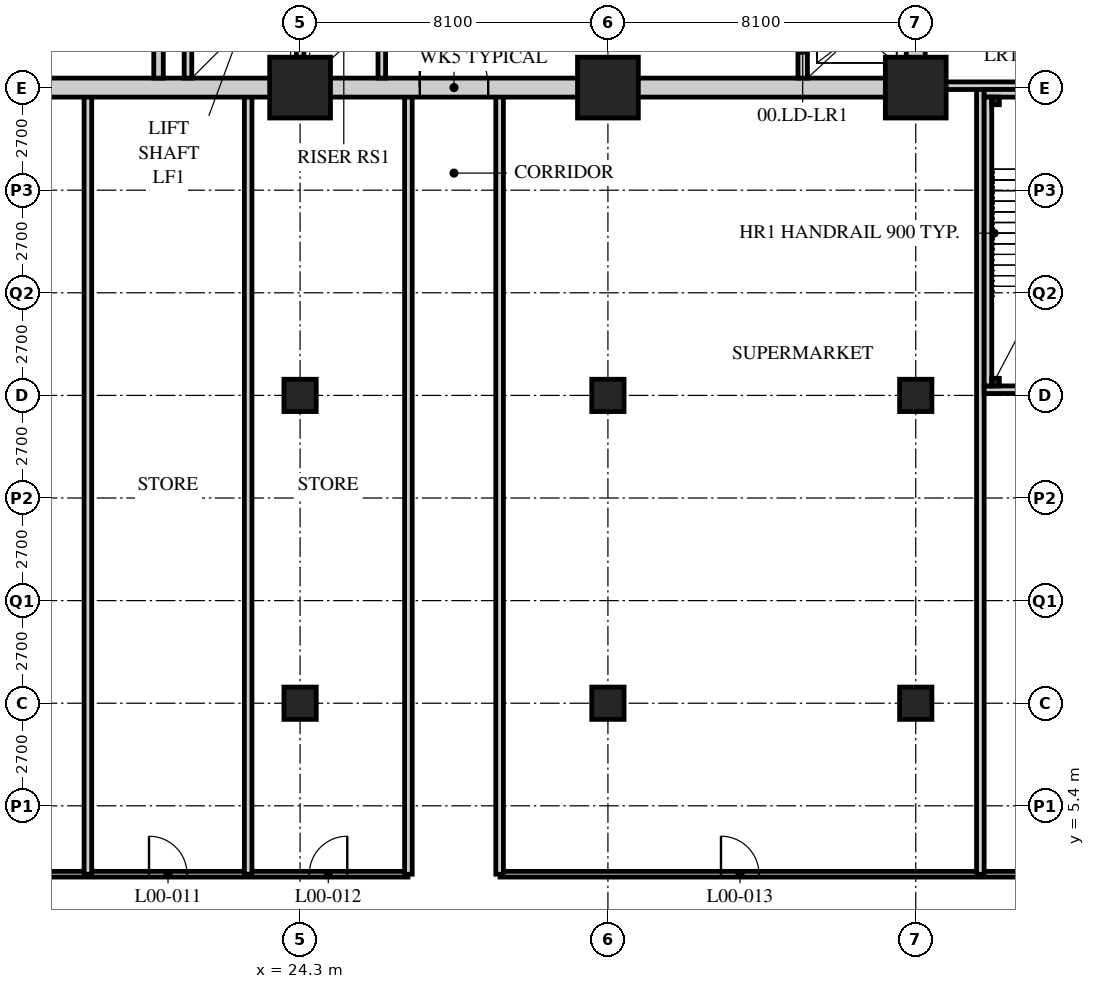
"""IFC4 building model, lengths in metres.
Left out: names, types, materials, properties, quantities, classifications, styles, units other than length and angle.
Written with IfcOpenShell. Run it as: python <this file> out.ifc"""

import sys

from ifc_helpers import new_model, si_unit, direction, frame, frame_2d, origin, origin_2d, place, context, subcontext, project, spatial, rectangle, hollow_rectangle, extrude, element, fill, save


model = new_model("IFC4")
c1 = context("Model", 3, precision=1e-05, world=origin(), true_north=direction((0.0, 1.0)))
c2 = subcontext(c1, "Body", "Model", "MODEL_VIEW")
j1 = project(units=[si_unit("LENGTHUNIT", "METRE"), si_unit("PLANEANGLEUNIT", "RADIAN")], contexts=[c1])
p1 = place(None, origin())
s1 = spatial("IfcSite", under=j1, at=p1, CompositionType="ELEMENT")
p2 = place(p1, origin())
s2 = spatial("IfcBuilding", under=s1, at=p2, CompositionType="ELEMENT")
p3 = place(p2, origin())
s3 = spatial("IfcBuildingStorey", under=s2, at=p3, CompositionType="ELEMENT", Elevation=0.0)
for number, where, z_axis, x_axis in (
    (1, (24.3, 8.1, 0.0), (0.0, 0.0, 1.0), (1.0, 0.0, 0.0)),
    (2, (24.3, 16.2, 0.0), (0.0, 0.0, 1.0), (1.0, 0.0, 0.0)),
):
    element("IfcColumn", number, at=place(p3, frame(where, z_axis=z_axis, x_axis=x_axis)), inside=s3, PredefinedType="COLUMN", context=c2, shape_type="SweptSolid", body=[
        extrude(hollow_rectangle(XDim=0.85, YDim=0.85, WallThickness=0.085, at=origin_2d()), origin(), (0.0, 0.0, 1.0), 6.0),
    ])
p4 = place(p3, frame((24.3, 24.3, 0.0), z_axis=(0.0, 0.0, 1.0), x_axis=(1.0, 0.0, 0.0)))
e3 = element("IfcColumn", 3, at=p4, inside=s3, PredefinedType="COLUMN", context=c2, shape_type="SweptSolid", body=[
    extrude(hollow_rectangle(XDim=1.6, YDim=1.6, WallThickness=0.15, at=origin_2d()), origin(), (0.0, 0.0, 1.0), 6.0),
])
for number, where, z_axis, x_axis in (
    (4, (32.4, 8.1, 0.0), (0.0, 0.0, 1.0), (1.0, 0.0, 0.0)),
    (5, (32.4, 16.2, 0.0), (0.0, 0.0, 1.0), (1.0, 0.0, 0.0)),
):
    element("IfcColumn", number, at=place(p3, frame(where, z_axis=z_axis, x_axis=x_axis)), inside=s3, PredefinedType="COLUMN", context=c2, shape_type="SweptSolid", body=[
        extrude(hollow_rectangle(XDim=0.85, YDim=0.85, WallThickness=0.085, at=origin_2d()), origin(), (0.0, 0.0, 1.0), 6.0),
    ])
p5 = place(p3, frame((32.4, 24.3, 0.0), z_axis=(0.0, 0.0, 1.0), x_axis=(1.0, 0.0, 0.0)))
e6 = element("IfcColumn", 6, at=p5, inside=s3, PredefinedType="COLUMN", context=c2, shape_type="SweptSolid", body=[
    extrude(hollow_rectangle(XDim=1.6, YDim=1.6, WallThickness=0.15, at=origin_2d()), origin(), (0.0, 0.0, 1.0), 6.0),
])
for number, where, z_axis, x_axis in (
    (7, (40.5, 8.1, 0.0), (0.0, 0.0, 1.0), (1.0, 0.0, 0.0)),
    (8, (40.5, 16.2, 0.0), (0.0, 0.0, 1.0), (1.0, 0.0, 0.0)),
):
    element("IfcColumn", number, at=place(p3, frame(where, z_axis=z_axis, x_axis=x_axis)), inside=s3, PredefinedType="COLUMN", context=c2, shape_type="SweptSolid", body=[
        extrude(hollow_rectangle(XDim=0.85, YDim=0.85, WallThickness=0.085, at=origin_2d()), origin(), (0.0, 0.0, 1.0), 6.0),
    ])
p6 = place(p3, frame((40.5, 24.3, 0.0), z_axis=(0.0, 0.0, 1.0), x_axis=(1.0, 0.0, 0.0)))
e9 = element("IfcColumn", 9, at=p6, inside=s3, PredefinedType="COLUMN", context=c2, shape_type="SweptSolid", body=[
    extrude(hollow_rectangle(XDim=1.6, YDim=1.6, WallThickness=0.15, at=origin_2d()), origin(), (0.0, 0.0, 1.0), 6.0),
])
p7 = place(p3, frame((3.6, 3.6, 0.0), z_axis=(0.0, 0.0, 1.0), x_axis=(1.0, 0.0, 0.0)))
e10 = element("IfcWall", 10, at=p7, inside=s3, PredefinedType="PARTITIONING", context=c2, shape_type="SweptSolid", body=[
    extrude(rectangle(XDim=23.54, YDim=0.15, at=frame_2d((11.77, 0.0))), origin(), (0.0, 0.0, 1.0), 5.75),
])
p8 = place(p7, frame((2.65, 0.0, 0.0)))
e11 = element("IfcOpeningElement", 11, at=p8, cuts=e10, PredefinedType="OPENING", context=c2, shape_type="SweptSolid", body=[
    extrude(rectangle(XDim=1.0, YDim=2.1, at=frame_2d((0.5, 1.05))), frame((0.0, 0.085, 0.0), z_axis=(0.0, -1.0, 0.0), x_axis=(1.0, 0.0, 0.0)), (0.0, 0.0, 1.0), 0.17),
])
p9 = place(p7, frame((12.508, 0.0, 0.0)))
e12 = element("IfcOpeningElement", 12, at=p9, cuts=e10, PredefinedType="OPENING", context=c2, shape_type="SweptSolid", body=[
    extrude(rectangle(XDim=1.0, YDim=2.1, at=frame_2d((0.5, 1.05))), frame((0.0, 0.085, 0.0), z_axis=(0.0, -1.0, 0.0), x_axis=(1.0, 0.0, 0.0)), (0.0, 0.0, 1.0), 0.17),
])
p10 = place(p7, frame((16.725, 0.0, 0.0)))
e13 = element("IfcOpeningElement", 13, at=p10, cuts=e10, PredefinedType="OPENING", context=c2, shape_type="SweptSolid", body=[
    extrude(rectangle(XDim=1.0, YDim=2.1, at=frame_2d((0.5, 1.05))), frame((0.0, 0.085, 0.0), z_axis=(0.0, -1.0, 0.0), x_axis=(1.0, 0.0, 0.0)), (0.0, 0.0, 1.0), 0.17),
])
p11 = place(p7, frame((20.942, 0.0, 0.0)))
e14 = element("IfcOpeningElement", 14, at=p11, cuts=e10, PredefinedType="OPENING", context=c2, shape_type="SweptSolid", body=[
    extrude(rectangle(XDim=1.0, YDim=2.1, at=frame_2d((0.5, 1.05))), frame((0.0, 0.085, 0.0), z_axis=(0.0, -1.0, 0.0), x_axis=(1.0, 0.0, 0.0)), (0.0, 0.0, 1.0), 0.17),
])
p12 = place(p3, frame((29.56, 3.6, 0.0), z_axis=(0.0, 0.0, 1.0), x_axis=(1.0, 0.0, 0.0)))
e15 = element("IfcWall", 15, at=p12, inside=s3, PredefinedType="PARTITIONING", context=c2, shape_type="SweptSolid", body=[
    extrude(rectangle(XDim=23.54, YDim=0.15, at=frame_2d((11.77, 0.0))), origin(), (0.0, 0.0, 1.0), 5.75),
])
p13 = place(p12, frame((5.815, 0.0, 0.0)))
e16 = element("IfcOpeningElement", 16, at=p13, cuts=e15, PredefinedType="OPENING", context=c2, shape_type="SweptSolid", body=[
    extrude(rectangle(XDim=1.0, YDim=2.1, at=frame_2d((0.5, 1.05))), frame((0.0, 0.085, 0.0), z_axis=(0.0, -1.0, 0.0), x_axis=(1.0, 0.0, 0.0)), (0.0, 0.0, 1.0), 0.17),
])
p14 = place(p12, frame((19.89, 0.0, 0.0)))
e17 = element("IfcOpeningElement", 17, at=p14, cuts=e15, PredefinedType="OPENING", context=c2, shape_type="SweptSolid", body=[
    extrude(rectangle(XDim=1.0, YDim=2.1, at=frame_2d((0.5, 1.05))), frame((0.0, 0.085, 0.0), z_axis=(0.0, -1.0, 0.0), x_axis=(1.0, 0.0, 0.0)), (0.0, 0.0, 1.0), 0.17),
])
for number, where, z_axis, x_axis in (
    (18, (18.717, 3.6, 0.0), (0.0, 0.0, 1.0), (0.0, 1.0, 0.0)),
    (19, (22.933, 3.6, 0.0), (0.0, 0.0, 1.0), (0.0, 1.0, 0.0)),
    (20, (42.2, 3.6, 0.0), (0.0, 0.0, 1.0), (0.0, 1.0, 0.0)),
    (21, (27.15, 3.6, 0.0), (0.0, 0.0, 1.0), (0.0, 1.0, 0.0)),
    (22, (29.55, 3.6, 0.0), (0.0, 0.0, 1.0), (0.0, 1.0, 0.0)),
):
    element("IfcWall", number, at=place(p3, frame(where, z_axis=z_axis, x_axis=x_axis)), inside=s3, PredefinedType="SOLIDWALL", context=c2, shape_type="SweptSolid", body=[
        extrude(rectangle(XDim=20.7, YDim=0.2, at=frame_2d((10.35, 0.0))), origin(), (0.0, 0.0, 1.0), 5.75),
    ])
p15 = place(p3, frame((40.5, 24.35, 0.0), z_axis=(0.0, 0.0, 1.0), x_axis=(1.0, 0.0, 0.0)))
e23 = element("IfcWall", 23, at=p15, inside=s3, PredefinedType="SOLIDWALL", context=c2, shape_type="SweptSolid", body=[
    extrude(rectangle(XDim=12.6, YDim=0.2, at=frame_2d((6.3, 0.0))), origin(), (0.0, 0.0, 1.0), 5.138),
])
p16 = place(p3, frame((15.95, 24.3, 0.0), z_axis=(0.0, 0.0, 1.0), x_axis=(1.0, 0.0, 0.0)))
e24 = element("IfcWall", 24, at=p16, inside=s3, PredefinedType="SOLIDWALL", context=c2, shape_type="SweptSolid", body=[
    extrude(rectangle(XDim=24.8, YDim=0.5, at=frame_2d((12.4, 0.0))), origin(), (0.0, 0.0, 1.0), 5.1),
])
p17 = place(p16, frame((11.5, 0.0, 0.0)))
e25 = element("IfcOpeningElement", 25, at=p17, cuts=e24, PredefinedType="OPENING", context=c2, shape_type="SweptSolid", body=[
    extrude(rectangle(XDim=1.8, YDim=2.4, at=frame_2d((0.9, 1.2))), frame((0.0, 0.26, 0.0), z_axis=(0.0, -1.0, 0.0), x_axis=(1.0, 0.0, 0.0)), (0.0, 0.0, 1.0), 0.52),
])
p18 = place(p3, frame((40.5, 24.55, 0.0), z_axis=(0.0, 0.0, 1.0), x_axis=(0.0, 1.0, 0.0)))
e26 = element("IfcWall", 26, at=p18, inside=s3, PredefinedType="SOLIDWALL", context=c2, shape_type="SweptSolid", body=[
    extrude(rectangle(XDim=15.7, YDim=0.5, at=frame_2d((7.85, 0.0))), origin(), (0.0, 0.0, 1.0), 5.138),
])
p19 = place(p3, frame((24.3, 24.55, 0.0), z_axis=(0.0, 0.0, 1.0), x_axis=(0.0, 1.0, 0.0)))
e27 = element("IfcWall", 27, at=p19, inside=s3, PredefinedType="SOLIDWALL", context=c2, shape_type="SweptSolid", body=[
    extrude(rectangle(XDim=7.75, YDim=0.2, at=frame_2d((3.875, 0.0))), origin(), (0.0, 0.0, 1.0), 5.05),
])
p20 = place(p19, frame((4.6, 0.0, 0.0)))
e28 = element("IfcOpeningElement", 28, at=p20, cuts=e27, PredefinedType="OPENING", context=c2, shape_type="SweptSolid", body=[
    extrude(rectangle(XDim=1.2, YDim=2.1, at=frame_2d((0.6, 1.05))), frame((0.0, 0.11, 0.0), z_axis=(0.0, -1.0, 0.0), x_axis=(1.0, 0.0, 0.0)), (0.0, 0.0, 1.0), 0.22),
])
p21 = place(p3, frame((20.575, 24.55, 0.0), z_axis=(0.0, 0.0, 1.0), x_axis=(0.0, 1.0, 0.0)))
e29 = element("IfcWall", 29, at=p21, inside=s3, PredefinedType="SOLIDWALL", context=c2, shape_type="SweptSolid", body=[
    extrude(rectangle(XDim=7.75, YDim=0.25, at=frame_2d((3.875, 0.0))), origin(), (0.0, 0.0, 1.0), 5.75),
])
p22 = place(p21, frame((6.2, 0.0, 0.0)))
e30 = element("IfcOpeningElement", 30, at=p22, cuts=e29, PredefinedType="OPENING", context=c2, shape_type="SweptSolid", body=[
    extrude(rectangle(XDim=1.2, YDim=2.1, at=frame_2d((0.6, 1.05))), frame((0.0, 0.135, 0.0), z_axis=(0.0, -1.0, 0.0), x_axis=(1.0, 0.0, 0.0)), (0.0, 0.0, 1.0), 0.27),
])
p23 = place(p3, frame((21.35, 24.55, 0.0), z_axis=(0.0, 0.0, 1.0), x_axis=(0.0, 1.0, 0.0)))
e31 = element("IfcWall", 31, at=p23, inside=s3, PredefinedType="SOLIDWALL", context=c2, shape_type="SweptSolid", body=[
    extrude(rectangle(XDim=2.6, YDim=0.2, at=frame_2d((1.3, 0.0))), origin(), (0.0, 0.0, 1.0), 5.75),
])
p24 = place(p3, frame((26.45, 24.55, 0.0), z_axis=(0.0, 0.0, 1.0), x_axis=(0.0, 1.0, 0.0)))
e32 = element("IfcWall", 32, at=p24, inside=s3, PredefinedType="SOLIDWALL", context=c2, shape_type="SweptSolid", body=[
    extrude(rectangle(XDim=1.6, YDim=0.2, at=frame_2d((0.8, 0.0))), origin(), (0.0, 0.0, 1.0), 5.75),
])
p25 = place(p3, frame((37.525, 24.55, 0.0), z_axis=(0.0, 0.0, 1.0), x_axis=(0.0, 1.0, 0.0)))
e33 = element("IfcWall", 33, at=p25, inside=s3, PredefinedType="SOLIDWALL", context=c2, shape_type="SweptSolid", body=[
    extrude(rectangle(XDim=7.75, YDim=0.25, at=frame_2d((3.875, 0.0))), origin(), (0.0, 0.0, 1.0), 5.75),
])
p26 = place(p25, frame((0.65, 0.0, 0.0)))
e34 = element("IfcOpeningElement", 34, at=p26, cuts=e33, PredefinedType="OPENING", context=c2, shape_type="SweptSolid", body=[
    extrude(rectangle(XDim=1.1, YDim=2.4, at=frame_2d((0.55, 1.2))), frame((0.0, 0.135, 0.0), z_axis=(0.0, -1.0, 0.0), x_axis=(1.0, 0.0, 0.0)), (0.0, 0.0, 1.0), 0.27),
])
p27 = place(p25, frame((3.25, 0.0, 0.0)))
e35 = element("IfcOpeningElement", 35, at=p27, cuts=e33, PredefinedType="OPENING", context=c2, shape_type="SweptSolid", body=[
    extrude(rectangle(XDim=1.1, YDim=2.4, at=frame_2d((0.55, 1.2))), frame((0.0, 0.135, 0.0), z_axis=(0.0, -1.0, 0.0), x_axis=(1.0, 0.0, 0.0)), (0.0, 0.0, 1.0), 0.27),
])
p28 = place(p25, frame((5.85, 0.0, 0.0)))
e36 = element("IfcOpeningElement", 36, at=p28, cuts=e33, PredefinedType="OPENING", context=c2, shape_type="SweptSolid", body=[
    extrude(rectangle(XDim=1.1, YDim=2.4, at=frame_2d((0.55, 1.2))), frame((0.0, 0.135, 0.0), z_axis=(0.0, -1.0, 0.0), x_axis=(1.0, 0.0, 0.0)), (0.0, 0.0, 1.0), 0.27),
])
p29 = place(p3, frame((42.3, 16.35, 0.0), z_axis=(0.0, 0.0, 1.0), x_axis=(1.0, 0.0, 0.0)))
e37 = element("IfcWall", 37, at=p29, inside=s3, PredefinedType="SOLIDWALL", context=c2, shape_type="SweptSolid", body=[
    extrude(rectangle(XDim=4.4, YDim=0.2, at=frame_2d((2.2, 0.0))), origin(), (0.0, 0.0, 1.0), 5.138),
])
p30 = place(p29, frame((1.6, 0.0, 0.0)))
e38 = element("IfcOpeningElement", 38, at=p30, cuts=e37, PredefinedType="OPENING", context=c2, shape_type="SweptSolid", body=[
    extrude(rectangle(XDim=1.2, YDim=2.1, at=frame_2d((0.6, 1.05))), frame((0.0, 0.11, 0.0), z_axis=(0.0, -1.0, 0.0), x_axis=(1.0, 0.0, 0.0)), (0.0, 0.0, 1.0), 0.22),
])
p31 = place(p3, frame((42.3, 24.15, 0.0), z_axis=(0.0, 0.0, 1.0), x_axis=(1.0, 0.0, 0.0)))
e39 = element("IfcWall", 39, at=p31, inside=s3, PredefinedType="SOLIDWALL", context=c2, shape_type="SweptSolid", body=[
    extrude(rectangle(XDim=4.4, YDim=0.2, at=frame_2d((2.2, 0.0))), origin(), (0.0, 0.0, 1.0), 5.138),
])
p32 = place(p3, frame((42.4, 16.45, 0.0), z_axis=(0.0, 0.0, 1.0), x_axis=(0.0, 1.0, 0.0)))
e40 = element("IfcWall", 40, at=p32, inside=s3, PredefinedType="SOLIDWALL", context=c2, shape_type="SweptSolid", body=[
    extrude(rectangle(XDim=7.6, YDim=0.2, at=frame_2d((3.8, 0.0))), origin(), (0.0, 0.0, 1.0), 5.75),
])
for number, where, z_axis, x_axis in (
    (41, (42.6, 23.95, 0.0), (0.0, 0.0, 1.0), (1.0, 0.0, 0.0)),
    (42, (42.6, 16.55, 0.0), (0.0, 0.0, 1.0), (1.0, 0.0, 0.0)),
):
    element("IfcColumn", number, at=place(p3, frame(where, z_axis=z_axis, x_axis=x_axis)), inside=s3, PredefinedType="COLUMN", context=c2, shape_type="SweptSolid", body=[
        extrude(hollow_rectangle(XDim=0.2, YDim=0.2, WallThickness=0.012, at=origin_2d()), origin(), (0.0, 0.0, 1.0), 6.0),
    ])
p33 = place(p10, origin())
e43 = element("IfcDoor", 43, at=p33, inside=s3, OperationType="SINGLE_SWING_LEFT", PredefinedType="DOOR", context=c2, shape_type="SweptSolid", body=[
    extrude(rectangle(XDim=1.0, YDim=2.1, at=frame_2d((0.5, 1.05))), frame((0.0, 0.025, 0.0), z_axis=(0.0, -1.0, 0.0), x_axis=(1.0, 0.0, 0.0)), (0.0, 0.0, 1.0), 0.05),
])
fill(e13, e43)
p34 = place(p11, origin())
e44 = element("IfcDoor", 44, at=p34, inside=s3, OperationType="SINGLE_SWING_RIGHT", PredefinedType="DOOR", context=c2, shape_type="SweptSolid", body=[
    extrude(rectangle(XDim=1.0, YDim=2.1, at=frame_2d((0.5, 1.05))), frame((0.0, 0.025, 0.0), z_axis=(0.0, -1.0, 0.0), x_axis=(1.0, 0.0, 0.0)), (0.0, 0.0, 1.0), 0.05),
])
fill(e14, e44)
p35 = place(p13, origin())
e45 = element("IfcDoor", 45, at=p35, inside=s3, OperationType="SINGLE_SWING_LEFT", PredefinedType="DOOR", context=c2, shape_type="SweptSolid", body=[
    extrude(rectangle(XDim=1.0, YDim=2.1, at=frame_2d((0.5, 1.05))), frame((0.0, 0.025, 0.0), z_axis=(0.0, -1.0, 0.0), x_axis=(1.0, 0.0, 0.0)), (0.0, 0.0, 1.0), 0.05),
])
fill(e16, e45)
p36 = place(p26, origin())
e46 = element("IfcDoor", 46, at=p36, inside=s3, OperationType="DOUBLE_DOOR_SLIDING", PredefinedType="DOOR", context=c2, shape_type="SweptSolid", body=[
    extrude(rectangle(XDim=1.1, YDim=2.4, at=frame_2d((0.55, 1.2))), frame((0.0, 0.025, 0.0), z_axis=(0.0, -1.0, 0.0), x_axis=(1.0, 0.0, 0.0)), (0.0, 0.0, 1.0), 0.05),
])
fill(e34, e46)
p37 = place(p17, origin())
e47 = element("IfcDoor", 47, at=p37, inside=s3, OperationType="DOUBLE_DOOR_SINGLE_SWING", PredefinedType="DOOR", context=c2, shape_type="SweptSolid", body=[
    extrude(rectangle(XDim=1.8, YDim=2.4, at=frame_2d((0.9, 1.2))), frame((0.0, 0.025, 0.0), z_axis=(0.0, -1.0, 0.0), x_axis=(1.0, 0.0, 0.0)), (0.0, 0.0, 1.0), 0.05),
])
fill(e25, e47)
save(model, sys.argv[1])
